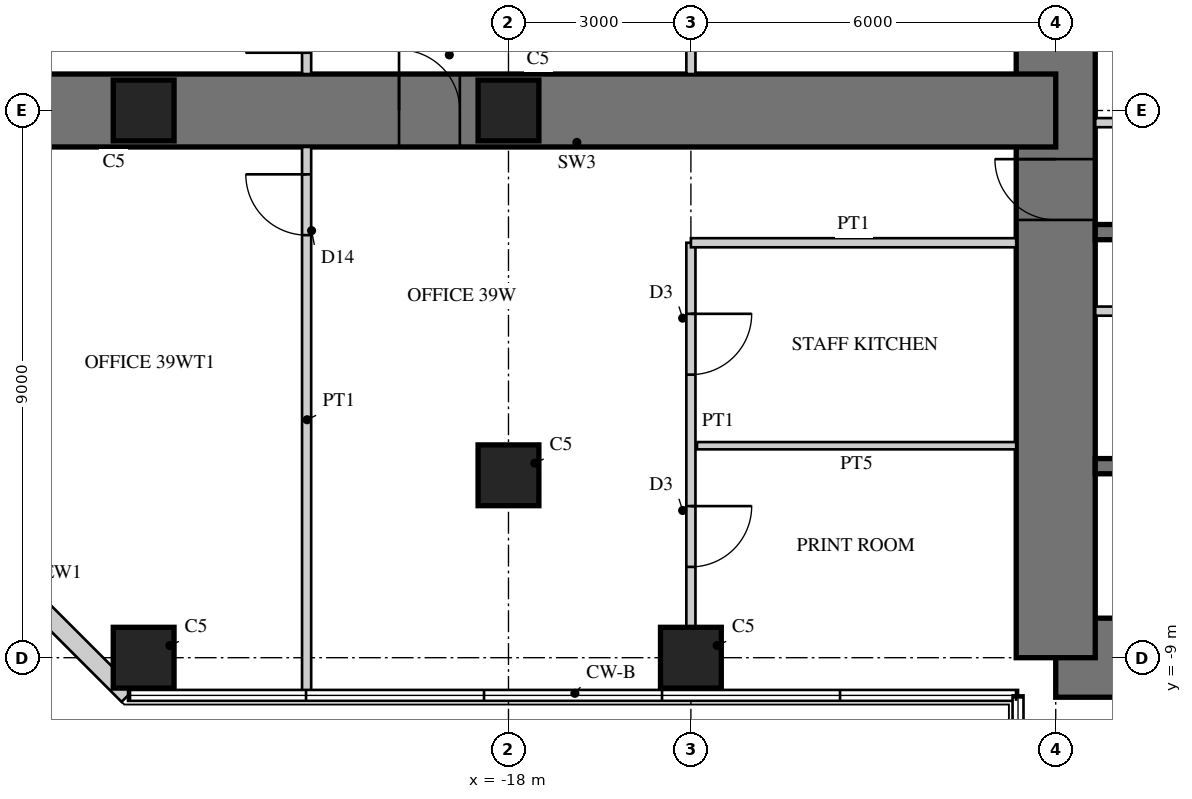
"""IFC4 building model, lengths in metres.
Left out: names, types, materials, properties, quantities, classifications, styles, units other than length and angle.
Written with IfcOpenShell. Run it as: python <this file> out.ifc"""

import sys

from ifc_helpers import new_model, si_unit, direction, frame, frame_2d, origin, origin_2d, place, context, subcontext, project, spatial, rectangle, extrude, element, fill, save


model = new_model("IFC4")
c1 = context("Model", 3, precision=1e-05, world=origin(), true_north=direction((0.0, 1.0)))
c2 = subcontext(c1, "Body", "Model", "MODEL_VIEW")
j1 = project(units=[si_unit("LENGTHUNIT", "METRE"), si_unit("PLANEANGLEUNIT", "RADIAN")], contexts=[c1])
p1 = place(None, origin())
s1 = spatial("IfcSite", under=j1, at=p1, CompositionType="ELEMENT")
p2 = place(p1, origin())
s2 = spatial("IfcBuilding", under=s1, at=p2, CompositionType="ELEMENT")
p3 = place(p2, frame((0.0, 0.0, 160.5)))
s3 = spatial("IfcBuildingStorey", under=s2, at=p3, CompositionType="ELEMENT", Elevation=160.5)
p4 = place(p3, frame((-9.0, -9.0, 0.0), z_axis=(0.0, 0.0, 1.0), x_axis=(1.0, 0.0, 0.0)))
e1 = element("IfcWall", 1, at=p4, inside=s3, PredefinedType="SHEAR", context=c2, shape_type="SweptSolid", body=[
    extrude(rectangle(XDim=18.0, YDim=1.3, at=frame_2d((9.0, 0.0))), origin(), (0.0, 0.0, 1.0), 4.0),
])
p5 = place(p4, frame((9.8, 0.0, 0.0)))
e2 = element("IfcOpeningElement", 2, at=p5, cuts=e1, PredefinedType="OPENING", context=c2, shape_type="SweptSolid", body=[
    extrude(rectangle(XDim=1.0, YDim=2.4, at=frame_2d((0.5, 1.2))), frame((0.0, 0.66, 0.0), z_axis=(0.0, -1.0, 0.0), x_axis=(1.0, 0.0, 0.0)), (0.0, 0.0, 1.0), 1.32),
])
p6 = place(p3, frame((-9.0, 9.0, 0.0), z_axis=(0.0, 0.0, 1.0), x_axis=(0.0, -1.0, 0.0)))
e3 = element("IfcWall", 3, at=p6, inside=s3, PredefinedType="SHEAR", context=c2, shape_type="SweptSolid", body=[
    extrude(rectangle(XDim=18.0, YDim=1.3, at=frame_2d((9.0, 0.0))), origin(), (0.0, 0.0, 1.0), 4.0),
])
p7 = place(p6, frame((9.8, 0.0, 0.0)))
e4 = element("IfcOpeningElement", 4, at=p7, cuts=e3, PredefinedType="OPENING", context=c2, shape_type="SweptSolid", body=[
    extrude(rectangle(XDim=1.0, YDim=2.4, at=frame_2d((0.5, 1.2))), frame((0.0, 0.66, 0.0), z_axis=(0.0, -1.0, 0.0), x_axis=(1.0, 0.0, 0.0)), (0.0, 0.0, 1.0), 1.32),
])
for number, where, z_axis, x_axis in (
    (5, (-1.925, -2.0, 0.0), (0.0, 0.0, 1.0), (-1.0, 0.0, 0.0)),
    (6, (-1.925, -5.85, 0.0), (0.0, 0.0, 1.0), (-1.0, 0.0, 0.0)),
):
    element("IfcWall", number, at=place(p3, frame(where, z_axis=z_axis, x_axis=x_axis)), inside=s3, PredefinedType="SHEAR", context=c2, shape_type="SweptSolid", body=[
        extrude(rectangle(XDim=6.425, YDim=0.25, at=frame_2d((3.212, 0.0))), origin(), (0.0, 0.0, 1.0), 4.0),
    ])
p8 = place(p3, frame((-1.925, -3.3, 0.0), z_axis=(0.0, 0.0, 1.0), x_axis=(-1.0, 0.0, 0.0)))
e7 = element("IfcWall", 7, at=p8, inside=s3, PredefinedType="PARTITIONING", context=c2, shape_type="SweptSolid", body=[
    extrude(rectangle(XDim=6.425, YDim=0.15, at=frame_2d((3.212, 0.0))), origin(), (0.0, 0.0, 1.0), 4.0),
])
p9 = place(p8, frame((0.075, 0.0, 0.0)))
e8 = element("IfcOpeningElement", 8, at=p9, cuts=e7, PredefinedType="OPENING", context=c2, shape_type="SweptSolid", body=[
    extrude(rectangle(XDim=0.8, YDim=2.1, at=frame_2d((0.4, 1.05))), frame((0.0, 0.085, 0.0), z_axis=(0.0, -1.0, 0.0), x_axis=(1.0, 0.0, 0.0)), (0.0, 0.0, 1.0), 0.17),
])
p10 = place(p8, frame((3.675, 0.0, 0.0)))
e9 = element("IfcOpeningElement", 9, at=p10, cuts=e7, PredefinedType="OPENING", context=c2, shape_type="SweptSolid", body=[
    extrude(rectangle(XDim=0.8, YDim=2.1, at=frame_2d((0.4, 1.05))), frame((0.0, 0.085, 0.0), z_axis=(0.0, -1.0, 0.0), x_axis=(1.0, 0.0, 0.0)), (0.0, 0.0, 1.0), 0.17),
])
p11 = place(p3, frame((-9.0, 0.0, 0.0), z_axis=(0.0, 0.0, 1.0), x_axis=(-1.0, 0.0, 0.0)))
e10 = element("IfcWall", 10, at=p11, inside=s3, PredefinedType="SHEAR", context=c2, shape_type="SweptSolid", body=[
    extrude(rectangle(XDim=18.0, YDim=1.2, at=frame_2d((9.0, 0.0))), origin(), (0.0, 0.0, 1.0), 4.0),
])
p12 = place(p11, frame((9.8, 0.0, 0.0)))
e11 = element("IfcOpeningElement", 11, at=p12, cuts=e10, PredefinedType="OPENING", context=c2, shape_type="SweptSolid", body=[
    extrude(rectangle(XDim=1.0, YDim=2.2, at=frame_2d((0.5, 1.1))), frame((0.0, 0.61, 0.0), z_axis=(0.0, -1.0, 0.0), x_axis=(1.0, 0.0, 0.0)), (0.0, 0.0, 1.0), 1.22),
])
for number, where, z_axis, x_axis in (
    (12, (-15.0, -9.0, 0.0), (0.0, 0.0, 1.0), (1.0, 0.0, 0.0)),
    (13, (-24.0, -9.0, 0.0), (0.0, 0.0, 1.0), (1.0, 0.0, 0.0)),
    (14, (-18.0, 0.0, 0.0), (0.0, 0.0, 1.0), (1.0, 0.0, 0.0)),
    (15, (-18.0, -6.0, 0.0), (0.0, 0.0, 1.0), (1.0, 0.0, 0.0)),
    (16, (-24.0, 0.0, 0.0), (0.0, 0.0, 1.0), (1.0, 0.0, 0.0)),
):
    element("IfcColumn", number, at=place(p3, frame(where, z_axis=z_axis, x_axis=x_axis)), inside=s3, PredefinedType="COLUMN", context=c2, shape_type="SweptSolid", body=[
        extrude(rectangle(XDim=1.0, YDim=1.0, at=origin_2d()), origin(), (0.0, 0.0, 1.0), 4.0),
    ])
p13 = place(p3, frame((-27.6, -6.277, 0.0), z_axis=(0.0, 0.0, 1.0), x_axis=(0.707106781187, -0.707106781187, 0.0)))
e17 = element("IfcWall", 17, at=p13, inside=s3, PredefinedType="SOLIDWALL", context=c2, shape_type="SweptSolid", body=[
    extrude(rectangle(XDim=4.728, YDim=0.3, at=frame_2d((2.364, 0.0))), origin(), (0.0, 0.0, 1.0), 3.75),
])
p14 = place(p13, frame((1.914, 0.0, 0.3)))
e18 = element("IfcOpeningElement", 18, at=p14, cuts=e17, PredefinedType="OPENING", context=c2, shape_type="SweptSolid", body=[
    extrude(rectangle(XDim=0.9, YDim=2.4, at=frame_2d((0.45, 1.2))), frame((0.0, 0.16, 0.0), z_axis=(0.0, -1.0, 0.0), x_axis=(1.0, 0.0, 0.0)), (0.0, 0.0, 1.0), 0.32),
])
p15 = place(p3, frame((-2.325, -0.2, 0.0), z_axis=(0.0, 0.0, 1.0), x_axis=(-1.0, 0.0, 0.0)))
e19 = element("IfcWall", 19, at=p15, inside=s3, PredefinedType="PARTITIONING", context=c2, shape_type="SweptSolid", body=[
    extrude(rectangle(XDim=6.025, YDim=0.15, at=frame_2d((3.013, 0.0))), origin(), (0.0, 0.0, 1.0), 3.75),
])
p16 = place(p15, frame((0.4, 0.0, 0.0)))
e20 = element("IfcOpeningElement", 20, at=p16, cuts=e19, PredefinedType="OPENING", context=c2, shape_type="SweptSolid", body=[
    extrude(rectangle(XDim=1.0, YDim=2.1, at=frame_2d((0.5, 1.05))), frame((0.0, 0.085, 0.0), z_axis=(0.0, -1.0, 0.0), x_axis=(1.0, 0.0, 0.0)), (0.0, 0.0, 1.0), 0.17),
])
p17 = place(p3, frame((-15.0, -2.175, 0.0), z_axis=(0.0, 0.0, 1.0), x_axis=(0.0, -1.0, 0.0)))
e21 = element("IfcWall", 21, at=p17, inside=s3, PredefinedType="PARTITIONING", context=c2, shape_type="SweptSolid", body=[
    extrude(rectangle(XDim=6.325, YDim=0.15, at=frame_2d((3.163, 0.0))), origin(), (0.0, 0.0, 1.0), 2.7),
])
p18 = place(p17, frame((1.169, 0.0, 0.0)))
e22 = element("IfcOpeningElement", 22, at=p18, cuts=e21, PredefinedType="OPENING", context=c2, shape_type="SweptSolid", body=[
    extrude(rectangle(XDim=1.0, YDim=2.1, at=frame_2d((0.5, 1.05))), frame((0.0, 0.085, 0.0), z_axis=(0.0, -1.0, 0.0), x_axis=(1.0, 0.0, 0.0)), (0.0, 0.0, 1.0), 0.17),
])
p19 = place(p17, frame((4.332, 0.0, 0.0)))
e23 = element("IfcOpeningElement", 23, at=p19, cuts=e21, PredefinedType="OPENING", context=c2, shape_type="SweptSolid", body=[
    extrude(rectangle(XDim=1.0, YDim=2.1, at=frame_2d((0.5, 1.05))), frame((0.0, 0.085, 0.0), z_axis=(0.0, -1.0, 0.0), x_axis=(1.0, 0.0, 0.0)), (0.0, 0.0, 1.0), 0.17),
])
p20 = place(p3, frame((-9.65, -2.175, 0.0), z_axis=(0.0, 0.0, 1.0), x_axis=(-1.0, 0.0, 0.0)))
e24 = element("IfcWall", 24, at=p20, inside=s3, PredefinedType="PARTITIONING", context=c2, shape_type="SweptSolid", body=[
    extrude(rectangle(XDim=5.35, YDim=0.15, at=frame_2d((2.675, 0.0))), origin(), (0.0, 0.0, 1.0), 3.75),
])
p21 = place(p3, frame((-9.65, -5.513, 0.0), z_axis=(0.0, 0.0, 1.0), x_axis=(-1.0, 0.0, 0.0)))
e25 = element("IfcWall", 25, at=p21, inside=s3, PredefinedType="PLUMBINGWALL", context=c2, shape_type="SweptSolid", body=[
    extrude(rectangle(XDim=5.25, YDim=0.12, at=frame_2d((2.625, 0.0))), origin(), (0.0, 0.0, 1.0), 3.75),
])
p22 = place(p3, frame((-15.0, 8.5, 0.0), z_axis=(0.0, 0.0, 1.0), x_axis=(0.0, -1.0, 0.0)))
e26 = element("IfcWall", 26, at=p22, inside=s3, PredefinedType="PARTITIONING", context=c2, shape_type="SweptSolid", body=[
    extrude(rectangle(XDim=7.9, YDim=0.15, at=frame_2d((3.95, 0.0))), origin(), (0.0, 0.0, 1.0), 2.7),
])
p23 = place(p22, frame((3.45, 0.0, 0.0)))
e27 = element("IfcOpeningElement", 27, at=p23, cuts=e26, PredefinedType="OPENING", context=c2, shape_type="SweptSolid", body=[
    extrude(rectangle(XDim=1.0, YDim=2.1, at=frame_2d((0.5, 1.05))), frame((0.0, 0.085, 0.0), z_axis=(0.0, -1.0, 0.0), x_axis=(1.0, 0.0, 0.0)), (0.0, 0.0, 1.0), 0.17),
])
p24 = place(p3, frame((-21.32, -0.6, 0.0), z_axis=(0.0, 0.0, 1.0), x_axis=(0.0, -1.0, 0.0)))
e28 = element("IfcWall", 28, at=p24, inside=s3, PredefinedType="PARTITIONING", context=c2, shape_type="SweptSolid", body=[
    extrude(rectangle(XDim=8.98, YDim=0.15, at=frame_2d((4.49, 0.0))), origin(), (0.0, 0.0, 1.0), 3.75),
])
p25 = place(p24, frame((0.45, 0.0, 0.0)))
e29 = element("IfcOpeningElement", 29, at=p25, cuts=e28, PredefinedType="OPENING", context=c2, shape_type="SweptSolid", body=[
    extrude(rectangle(XDim=1.0, YDim=2.2, at=frame_2d((0.5, 1.1))), frame((0.0, 0.085, 0.0), z_axis=(0.0, -1.0, 0.0), x_axis=(1.0, 0.0, 0.0)), (0.0, 0.0, 1.0), 0.17),
])
p26 = place(p3, frame((-21.32, 9.58, 0.0), z_axis=(0.0, 0.0, 1.0), x_axis=(0.0, -1.0, 0.0)))
e30 = element("IfcWall", 30, at=p26, inside=s3, PredefinedType="PARTITIONING", context=c2, shape_type="SweptSolid", body=[
    extrude(rectangle(XDim=8.98, YDim=0.15, at=frame_2d((4.49, 0.0))), origin(), (0.0, 0.0, 1.0), 3.75),
])
p27 = place(p26, frame((4.987, 0.0, 0.0)))
e31 = element("IfcOpeningElement", 31, at=p27, cuts=e30, PredefinedType="OPENING", context=c2, shape_type="SweptSolid", body=[
    extrude(rectangle(XDim=1.0, YDim=2.2, at=frame_2d((0.5, 1.1))), frame((0.0, 0.085, 0.0), z_axis=(0.0, -1.0, 0.0), x_axis=(1.0, 0.0, 0.0)), (0.0, 0.0, 1.0), 0.17),
])
p28 = place(p26, frame((7.63, 0.0, 0.0)))
e32 = element("IfcOpeningElement", 32, at=p28, cuts=e30, PredefinedType="OPENING", context=c2, shape_type="SweptSolid", body=[
    extrude(rectangle(XDim=1.0, YDim=2.2, at=frame_2d((0.5, 1.1))), frame((0.0, 0.085, 0.0), z_axis=(0.0, -1.0, 0.0), x_axis=(1.0, 0.0, 0.0)), (0.0, 0.0, 1.0), 0.17),
])
p29 = place(p18, origin())
e33 = element("IfcDoor", 33, at=p29, inside=s3, OperationType="SINGLE_SWING_LEFT", PredefinedType="DOOR", context=c2, shape_type="SweptSolid", body=[
    extrude(rectangle(XDim=1.0, YDim=2.1, at=frame_2d((0.5, 1.05))), frame((0.0, 0.025, 0.0), z_axis=(0.0, -1.0, 0.0), x_axis=(1.0, 0.0, 0.0)), (0.0, 0.0, 1.0), 0.05),
])
fill(e22, e33)
p30 = place(p19, origin())
e34 = element("IfcDoor", 34, at=p30, inside=s3, OperationType="SINGLE_SWING_LEFT", PredefinedType="DOOR", context=c2, shape_type="SweptSolid", body=[
    extrude(rectangle(XDim=1.0, YDim=2.1, at=frame_2d((0.5, 1.05))), frame((0.0, 0.025, 0.0), z_axis=(0.0, -1.0, 0.0), x_axis=(1.0, 0.0, 0.0)), (0.0, 0.0, 1.0), 0.05),
])
fill(e23, e34)
p31 = place(p25, frame((1.0, 0.0, 0.0), z_axis=(0.0, 0.0, 1.0), x_axis=(-1.0, 0.0, 0.0)))
e35 = element("IfcDoor", 35, at=p31, inside=s3, OperationType="SINGLE_SWING_RIGHT", PredefinedType="DOOR", context=c2, shape_type="SweptSolid", body=[
    extrude(rectangle(XDim=1.0, YDim=2.2, at=frame_2d((0.5, 1.1))), frame((0.0, 0.025, 0.0), z_axis=(0.0, -1.0, 0.0), x_axis=(1.0, 0.0, 0.0)), (0.0, 0.0, 1.0), 0.05),
])
fill(e29, e35)
p32 = place(p28, frame((1.0, 0.0, 0.0), z_axis=(0.0, 0.0, 1.0), x_axis=(-1.0, 0.0, 0.0)))
e36 = element("IfcDoor", 36, at=p32, inside=s3, OperationType="SINGLE_SWING_LEFT", PredefinedType="DOOR", context=c2, shape_type="SweptSolid", body=[
    extrude(rectangle(XDim=1.0, YDim=2.2, at=frame_2d((0.5, 1.1))), frame((0.0, 0.025, 0.0), z_axis=(0.0, -1.0, 0.0), x_axis=(1.0, 0.0, 0.0)), (0.0, 0.0, 1.0), 0.05),
])
fill(e32, e36)
p33 = place(p12, frame((1.0, 0.0, 0.0), z_axis=(0.0, 0.0, 1.0), x_axis=(-1.0, 0.0, 0.0)))
e37 = element("IfcDoor", 37, at=p33, inside=s3, OperationType="SINGLE_SWING_LEFT", PredefinedType="DOOR", context=c2, shape_type="SweptSolid", body=[
    extrude(rectangle(XDim=1.0, YDim=2.2, at=frame_2d((0.5, 1.1))), frame((0.0, 0.025, 0.0), z_axis=(0.0, -1.0, 0.0), x_axis=(1.0, 0.0, 0.0)), (0.0, 0.0, 1.0), 0.05),
])
fill(e11, e37)
p34 = place(p7, frame((1.0, 0.0, 0.0), z_axis=(0.0, 0.0, 1.0), x_axis=(-1.0, 0.0, 0.0)))
e38 = element("IfcDoor", 38, at=p34, inside=s3, OperationType="SINGLE_SWING_RIGHT", PredefinedType="DOOR", context=c2, shape_type="SweptSolid", body=[
    extrude(rectangle(XDim=1.0, YDim=2.4, at=frame_2d((0.5, 1.2))), frame((0.0, -0.005, 0.0), z_axis=(0.0, -1.0, 0.0), x_axis=(1.0, 0.0, 0.0)), (0.0, 0.0, 1.0), 0.05),
])
fill(e4, e38)
save(model, sys.argv[1])
